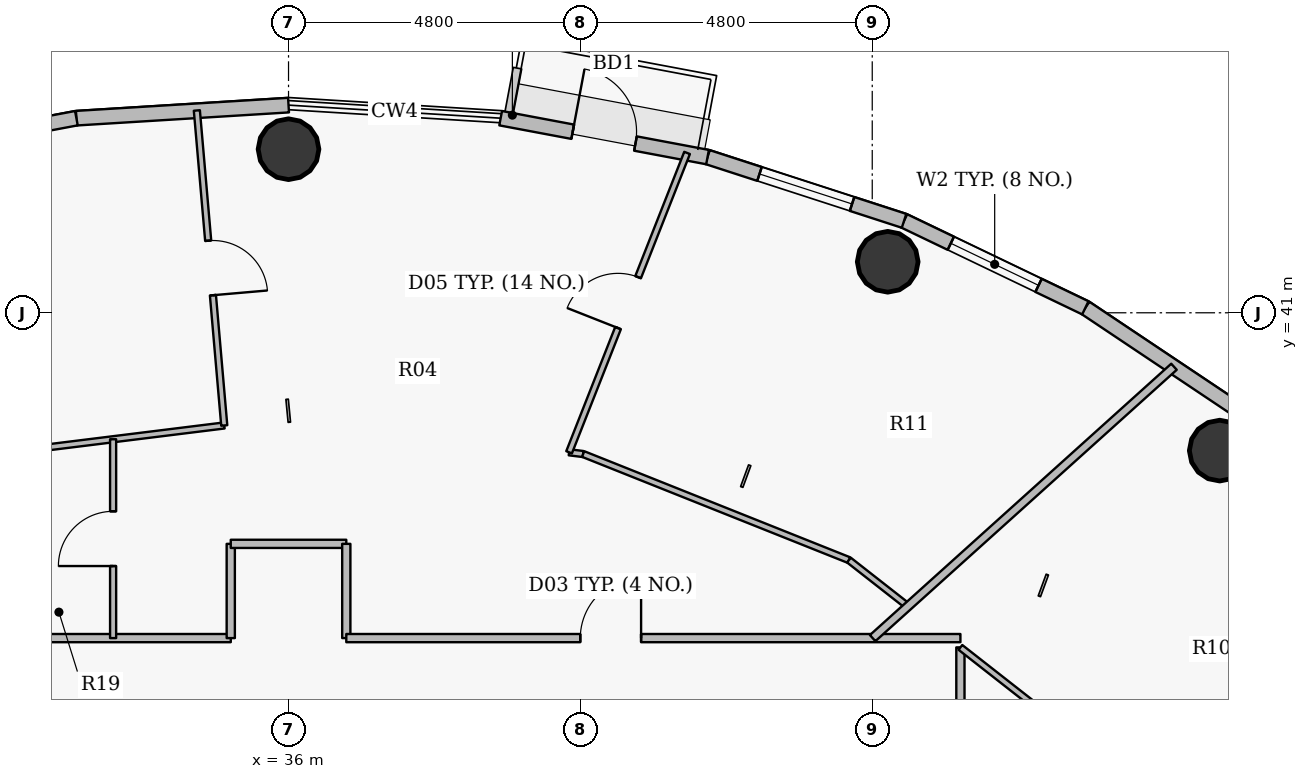
"""IFC4 building model, lengths in metres.
Left out: names, types, materials, properties, quantities, classifications, styles, units other than length and angle.
Written with IfcOpenShell. Run it as: python <this file> out.ifc"""

import sys

from ifc_helpers import new_model, si_unit, direction, frame, frame_2d, origin, origin_2d, place, context, subcontext, project, spatial, rectangle, hollow_circle, extrude, source, transform, mapped, element, fill, save


model = new_model("IFC4")
c1 = context("Model", 3, precision=1e-05, world=origin(), true_north=direction((0.0, 1.0)))
c2 = subcontext(c1, "Body", "Model", "MODEL_VIEW")
j1 = project(units=[si_unit("LENGTHUNIT", "METRE"), si_unit("PLANEANGLEUNIT", "RADIAN")], contexts=[c1])
p1 = place(None, origin())
s1 = spatial("IfcSite", under=j1, at=p1, CompositionType="ELEMENT")
p2 = place(p1, origin())
s2 = spatial("IfcBuilding", under=s1, at=p2, CompositionType="ELEMENT")
p3 = place(p2, frame((0.0, 0.0, 291.75)))
s3 = spatial("IfcBuildingStorey", under=s2, at=p3, CompositionType="ELEMENT", Elevation=291.75)
for number, where, z_axis, x_axis in (
    (1, (51.315, 38.733, 0.0), (0.0, 0.0, 1.0), (1.0, 0.0, 0.0)),
    (2, (45.854, 41.839, 0.0), (0.0, 0.0, 1.0), (1.0, 0.0, 0.0)),
    (3, (36.0, 43.69, 0.0), (0.0, 0.0, 1.0), (1.0, 0.0, 0.0)),
):
    element("IfcColumn", number, at=place(p3, frame(where, z_axis=z_axis, x_axis=x_axis)), inside=s3, PredefinedType="COLUMN", context=c2, shape_type="SweptSolid", body=[
        extrude(hollow_circle(Radius=0.5, WallThickness=0.032, at=origin_2d()), origin(), (0.0, 0.0, 1.0), 3.75),
    ])
p4 = place(p3, frame((49.104, 41.082, 0.0), z_axis=(0.0, 0.0, 1.0), x_axis=(0.831250592635, -0.55589787933, 0.0)))
e4 = element("IfcWall", 4, at=p4, inside=s3, PredefinedType="SOLIDWALL", context=c2, shape_type="SweptSolid", body=[
    extrude(rectangle(XDim=3.197, YDim=0.24, at=frame_2d((1.599, 0.0))), origin(), (0.0, 0.0, 1.0), 3.5),
])
p5 = place(p3, frame((46.123, 42.512, 0.0), z_axis=(0.0, 0.0, 1.0), x_axis=(0.901573741254, -0.43262546051, 0.0)))
e5 = element("IfcWall", 5, at=p5, inside=s3, PredefinedType="SOLIDWALL", context=c2, shape_type="SweptSolid", body=[
    extrude(rectangle(XDim=3.307, YDim=0.24, at=frame_2d((1.653, 0.0))), origin(), (0.0, 0.0, 1.0), 3.5),
])
p6 = place(p5, frame((0.853, 0.0, 0.9)))
e6 = element("IfcOpeningElement", 6, at=p6, cuts=e5, PredefinedType="OPENING", context=c2, shape_type="SweptSolid", body=[
    extrude(rectangle(XDim=1.6, YDim=1.75, at=origin_2d()), frame((0.8, 0.13, 0.875), z_axis=(0.0, -1.0, 0.0), x_axis=(1.0, 0.0, 0.0)), (0.0, 0.0, 1.0), 0.26),
])
p7 = place(p3, frame((42.891, 43.56, 0.0), z_axis=(0.0, 0.0, 1.0), x_axis=(0.95123136723, -0.308478339592, 0.0)))
e7 = element("IfcWall", 7, at=p7, inside=s3, PredefinedType="SOLIDWALL", context=c2, shape_type="SweptSolid", body=[
    extrude(rectangle(XDim=3.398, YDim=0.24, at=frame_2d((1.699, 0.0))), origin(), (0.0, 0.0, 1.0), 3.5),
])
p8 = place(p7, frame((0.899, 0.0, 0.9)))
e8 = element("IfcOpeningElement", 8, at=p8, cuts=e7, PredefinedType="OPENING", context=c2, shape_type="SweptSolid", body=[
    extrude(rectangle(XDim=1.6, YDim=1.75, at=origin_2d()), frame((0.8, 0.13, 0.875), z_axis=(0.0, -1.0, 0.0), x_axis=(1.0, 0.0, 0.0)), (0.0, 0.0, 1.0), 0.26),
])
p9 = place(p3, frame((39.489, 44.2, 0.0), z_axis=(0.0, 0.0, 1.0), x_axis=(0.982782655757, -0.184765395959, 0.0)))
e9 = element("IfcWall", 9, at=p9, inside=s3, PredefinedType="SOLIDWALL", context=c2, shape_type="SweptSolid", body=[
    extrude(rectangle(XDim=3.462, YDim=0.24, at=frame_2d((1.731, 0.0))), origin(), (0.0, 0.0, 1.0), 3.5),
])
p10 = place(p9, frame((1.206, 0.0, 0.0)))
e10 = element("IfcOpeningElement", 10, at=p10, cuts=e9, PredefinedType="OPENING", context=c2, shape_type="SweptSolid", body=[
    extrude(rectangle(XDim=1.05, YDim=2.15, at=origin_2d()), frame((0.525, 0.13, 1.075), z_axis=(0.0, -1.0, 0.0), x_axis=(1.0, 0.0, 0.0)), (0.0, 0.0, 1.0), 0.26),
])
p11 = place(p3, frame((32.511, 44.2, 0.0), z_axis=(0.0, 0.0, 1.0), x_axis=(0.998104946479, 0.061534671648, 0.0)))
e11 = element("IfcWall", 11, at=p11, inside=s3, PredefinedType="SOLIDWALL", context=c2, shape_type="SweptSolid", body=[
    extrude(rectangle(XDim=3.495, YDim=0.24, at=frame_2d((1.748, 0.0))), origin(), (0.0, 0.0, 1.0), 3.5),
])
p12 = place(p3, frame((29.109, 43.56, 0.0), z_axis=(0.0, 0.0, 1.0), x_axis=(0.982782655757, 0.184765395959, 0.0)))
e12 = element("IfcWall", 12, at=p12, inside=s3, PredefinedType="SOLIDWALL", context=c2, shape_type="SweptSolid", body=[
    extrude(rectangle(XDim=3.462, YDim=0.24, at=frame_2d((1.731, 0.0))), origin(), (0.0, 0.0, 1.0), 3.5),
])
p13 = place(p12, frame((1.106, 0.0, 0.9)))
e13 = element("IfcOpeningElement", 13, at=p13, cuts=e12, PredefinedType="OPENING", context=c2, shape_type="SweptSolid", body=[
    extrude(rectangle(XDim=1.25, YDim=1.65, at=origin_2d()), frame((0.625, 0.13, 0.825), z_axis=(0.0, -1.0, 0.0), x_axis=(1.0, 0.0, 0.0)), (0.0, 0.0, 1.0), 0.26),
])
p14 = place(p3, frame((24.95, 35.65, 0.0), z_axis=(0.0, 0.0, 1.0), x_axis=(1.0, 0.0, 0.0)))
e14 = element("IfcWall", 14, at=p14, inside=s3, PredefinedType="PARTITIONING", context=c2, shape_type="SweptSolid", body=[
    extrude(rectangle(XDim=10.1, YDim=0.135, at=frame_2d((5.05, 0.0))), origin(), (0.0, 0.0, 1.0), 3.035),
])
p15 = place(p3, frame((31.333, 38.699, 0.0), z_axis=(0.0, 0.0, 1.0), x_axis=(0.992398193069, 0.123068380965, 0.0)))
e15 = element("IfcWall", 15, at=p15, inside=s3, PredefinedType="PARTITIONING", context=c2, shape_type="SweptSolid", body=[
    extrude(rectangle(XDim=3.638, YDim=0.1, at=frame_2d((1.819, 0.0))), origin(), (0.0, 0.0, 1.0), 3.185),
])
p16 = place(p3, frame((33.115, 35.65, 0.0), z_axis=(0.0, 0.0, 1.0), x_axis=(0.0, 1.0, 0.0)))
e16 = element("IfcWall", 16, at=p16, inside=s3, PredefinedType="PARTITIONING", context=c2, shape_type="SweptSolid", body=[
    extrude(rectangle(XDim=3.27, YDim=0.1, at=frame_2d((1.635, 0.0))), origin(), (0.0, 0.0, 1.0), 3.5),
])
p17 = place(p16, frame((1.185, 0.0, 0.0)))
e17 = element("IfcOpeningElement", 17, at=p17, cuts=e16, PredefinedType="OPENING", context=c2, shape_type="SweptSolid", body=[
    extrude(rectangle(XDim=0.9, YDim=2.1, at=origin_2d()), frame((0.45, 0.06, 1.05), z_axis=(0.0, -1.0, 0.0), x_axis=(1.0, 0.0, 0.0)), (0.0, 0.0, 1.0), 0.12),
])
p18 = place(p3, frame((34.492, 44.327, 0.0), z_axis=(0.0, 0.0, 1.0), x_axis=(0.086674190257, -0.9962367112, 0.0)))
e18 = element("IfcWall", 18, at=p18, inside=s3, PredefinedType="PARTITIONING", context=c2, shape_type="SweptSolid", body=[
    extrude(rectangle(XDim=5.2, YDim=0.1, at=frame_2d((2.6, 0.0))), origin(), (0.0, 0.0, 1.0), 2.985),
])
p19 = place(p18, frame((2.15, 0.0, 0.0)))
e19 = element("IfcOpeningElement", 19, at=p19, cuts=e18, PredefinedType="OPENING", context=c2, shape_type="SweptSolid", body=[
    extrude(rectangle(XDim=0.9, YDim=2.1, at=origin_2d()), frame((0.45, 0.06, 1.05), z_axis=(0.0, -1.0, 0.0), x_axis=(1.0, 0.0, 0.0)), (0.0, 0.0, 1.0), 0.12),
])
p20 = place(p3, frame((35.05, 35.65, 0.0), z_axis=(0.0, 0.0, 1.0), x_axis=(0.0, 1.0, 0.0)))
e20 = element("IfcWall", 20, at=p20, inside=s3, PredefinedType="PARTITIONING", context=c2, shape_type="SweptSolid", body=[
    extrude(rectangle(XDim=1.55, YDim=0.135, at=frame_2d((0.775, 0.0))), origin(), (0.0, 0.0, 1.0), 3.5),
])
p21 = place(p3, frame((35.05, 37.2, 0.0), z_axis=(0.0, 0.0, 1.0), x_axis=(1.0, 0.0, 0.0)))
e21 = element("IfcWall", 21, at=p21, inside=s3, PredefinedType="PARTITIONING", context=c2, shape_type="SweptSolid", body=[
    extrude(rectangle(XDim=1.9, YDim=0.135, at=frame_2d((0.95, 0.0))), origin(), (0.0, 0.0, 1.0), 3.035),
])
p22 = place(p3, frame((36.95, 35.65, 0.0), z_axis=(0.0, 0.0, 1.0), x_axis=(0.0, 1.0, 0.0)))
e22 = element("IfcWall", 22, at=p22, inside=s3, PredefinedType="PARTITIONING", context=c2, shape_type="SweptSolid", body=[
    extrude(rectangle(XDim=1.55, YDim=0.135, at=frame_2d((0.775, 0.0))), origin(), (0.0, 0.0, 1.0), 3.5),
])
p23 = place(p3, frame((36.95, 35.65, 0.0), z_axis=(0.0, 0.0, 1.0), x_axis=(1.0, 0.0, 0.0)))
e23 = element("IfcWall", 23, at=p23, inside=s3, PredefinedType="PARTITIONING", context=c2, shape_type="SweptSolid", body=[
    extrude(rectangle(XDim=10.1, YDim=0.135, at=frame_2d((5.05, 0.0))), origin(), (0.0, 0.0, 1.0), 3.035),
])
p24 = place(p23, frame((3.848, 0.0, 0.0)))
e24 = element("IfcOpeningElement", 24, at=p24, cuts=e23, PredefinedType="OPENING", context=c2, shape_type="SweptSolid", body=[
    extrude(rectangle(XDim=1.0, YDim=2.15, at=origin_2d()), frame((0.5, 0.078, 1.075), z_axis=(0.0, -1.0, 0.0), x_axis=(1.0, 0.0, 0.0)), (0.0, 0.0, 1.0), 0.155),
])
p25 = place(p3, frame((40.614, 38.706, 0.0), z_axis=(0.0, 0.0, 1.0), x_axis=(0.992326164187, -0.123647821937, 0.0)))
e25 = element("IfcWall", 25, at=p25, inside=s3, PredefinedType="PARTITIONING", context=c2, shape_type="SweptSolid", body=[
    extrude(rectangle(XDim=0.233, YDim=0.1, at=frame_2d((0.116, 0.0))), origin(), (0.0, 0.0, 1.0), 3.5),
])
p26 = place(p3, frame((40.614, 38.706, 0.0), z_axis=(0.0, 0.0, 1.0), x_axis=(0.36670847824, 0.930335902772, 0.0)))
e26 = element("IfcWall", 26, at=p26, inside=s3, PredefinedType="PARTITIONING", context=c2, shape_type="SweptSolid", body=[
    extrude(rectangle(XDim=5.292, YDim=0.1, at=frame_2d((2.646, 0.0))), origin(), (0.0, 0.0, 1.0), 2.985),
])
p27 = place(p26, frame((2.196, 0.0, 0.0)))
e27 = element("IfcOpeningElement", 27, at=p27, cuts=e26, PredefinedType="OPENING", context=c2, shape_type="SweptSolid", body=[
    extrude(rectangle(XDim=0.9, YDim=2.1, at=origin_2d()), frame((0.45, 0.06, 1.05), z_axis=(0.0, -1.0, 0.0), x_axis=(1.0, 0.0, 0.0)), (0.0, 0.0, 1.0), 0.12),
])
p28 = place(p3, frame((40.845, 38.677, 0.0), z_axis=(0.0, 0.0, 1.0), x_axis=(0.928809047774, -0.370558703544, 0.0)))
e28 = element("IfcWall", 28, at=p28, inside=s3, PredefinedType="PARTITIONING", context=c2, shape_type="SweptSolid", body=[
    extrude(rectangle(XDim=4.706, YDim=0.1, at=frame_2d((2.353, 0.0))), origin(), (0.0, 0.0, 1.0), 3.035),
])
p29 = place(p3, frame((45.217, 36.933, 0.0), z_axis=(0.0, 0.0, 1.0), x_axis=(0.787354580016, -0.616500417946, 0.0)))
e29 = element("IfcWall", 29, at=p29, inside=s3, PredefinedType="PARTITIONING", context=c2, shape_type="SweptSolid", body=[
    extrude(rectangle(XDim=1.233, YDim=0.1, at=frame_2d((0.617, 0.0))), origin(), (0.0, 0.0, 1.0), 3.5),
])
p30 = place(p3, frame((45.607, 35.65, 0.0), z_axis=(0.0, 0.0, 1.0), x_axis=(0.743148504456, 0.669126520416, 0.0)))
e30 = element("IfcWall", 30, at=p30, inside=s3, PredefinedType="PARTITIONING", context=c2, shape_type="SweptSolid", body=[
    extrude(rectangle(XDim=6.669, YDim=0.135, at=frame_2d((3.334, 0.0))), origin(), (0.0, 0.0, 1.0), 2.985),
])
p31 = place(p3, frame((47.05, 18.503, 0.0), z_axis=(0.0, 0.0, 1.0), x_axis=(0.0, 1.0, 0.0)))
e31 = element("IfcWall", 31, at=p31, inside=s3, PredefinedType="PARTITIONING", context=c2, shape_type="SweptSolid", body=[
    extrude(rectangle(XDim=16.995, YDim=0.135, at=frame_2d((8.497, 0.0))), origin(), (0.0, 0.0, 1.0), 3.035),
])
p32 = place(p31, frame((7.997, 0.0, 0.0)))
e32 = element("IfcOpeningElement", 32, at=p32, cuts=e31, PredefinedType="OPENING", context=c2, shape_type="SweptSolid", body=[
    extrude(rectangle(XDim=1.0, YDim=2.15, at=origin_2d()), frame((0.5, 0.078, 1.075), z_axis=(0.0, -1.0, 0.0), x_axis=(1.0, 0.0, 0.0)), (0.0, 0.0, 1.0), 0.155),
])
p33 = place(p3, frame((47.05, 35.497, 0.0), z_axis=(0.0, 0.0, 1.0), x_axis=(0.787328855274, -0.616533270516, 0.0)))
e33 = element("IfcWall", 33, at=p33, inside=s3, PredefinedType="PARTITIONING", context=c2, shape_type="SweptSolid", body=[
    extrude(rectangle(XDim=2.077, YDim=0.1, at=frame_2d((1.039, 0.0))), origin(), (0.0, 0.0, 1.0), 3.035),
])
m1 = source(origin(), c2, "Body", "SweptSolid", [
    extrude(rectangle(XDim=1.6, YDim=1.75, at=origin_2d()), frame((0.8, 0.03, 0.875), z_axis=(0.0, -1.0, 0.0), x_axis=(1.0, 0.0, 0.0)), (0.0, 0.0, 1.0), 0.06),
])
p34 = place(p6, origin())
e34 = element("IfcWindow", 34, at=p34, inside=s3, PartitioningType="DOUBLE_PANEL_VERTICAL", PredefinedType="WINDOW", context=c2, shape_type="MappedRepresentation", body=[
    mapped(m1, transform((0.0, 0.0, 0.0), x_axis=(1.0, 0.0, 0.0), y_axis=(0.0, 1.0, 0.0), z_axis=(0.0, 0.0, 1.0), scale=1.0)),
])
fill(e6, e34)
p35 = place(p8, origin())
e35 = element("IfcWindow", 35, at=p35, inside=s3, PartitioningType="DOUBLE_PANEL_VERTICAL", PredefinedType="WINDOW", context=c2, shape_type="MappedRepresentation", body=[
    mapped(m1, transform((0.0, 0.0, 0.0), x_axis=(1.0, 0.0, 0.0), y_axis=(0.0, 1.0, 0.0), z_axis=(0.0, 0.0, 1.0), scale=1.0)),
])
fill(e8, e35)
m2 = source(origin(), c2, "Body", "SweptSolid", [
    extrude(rectangle(XDim=1.05, YDim=2.15, at=origin_2d()), frame((0.525, 0.025, 1.075), z_axis=(0.0, -1.0, 0.0), x_axis=(1.0, 0.0, 0.0)), (0.0, 0.0, 1.0), 0.05),
])
p36 = place(p10, origin())
e36 = element("IfcDoor", 36, at=p36, inside=s3, OperationType="SINGLE_SWING_LEFT", PredefinedType="DOOR", context=c2, shape_type="MappedRepresentation", body=[
    mapped(m2, transform((0.0, 0.0, 0.0), x_axis=(1.0, 0.0, 0.0), y_axis=(0.0, 1.0, 0.0), z_axis=(0.0, 0.0, 1.0), scale=1.0)),
])
fill(e10, e36)
m3 = source(origin(), c2, "Body", "SweptSolid", [
    extrude(rectangle(XDim=1.0, YDim=2.15, at=origin_2d()), frame((0.5, 0.025, 1.075), z_axis=(0.0, -1.0, 0.0), x_axis=(1.0, 0.0, 0.0)), (0.0, 0.0, 1.0), 0.05),
])
p37 = place(p24, origin())
e37 = element("IfcDoor", 37, at=p37, inside=s3, OperationType="SINGLE_SWING_RIGHT", PredefinedType="DOOR", context=c2, shape_type="MappedRepresentation", body=[
    mapped(m3, transform((0.0, 0.0, 0.0), x_axis=(1.0, 0.0, 0.0), y_axis=(0.0, 1.0, 0.0), z_axis=(0.0, 0.0, 1.0), scale=1.0)),
])
fill(e24, e37)
m4 = source(origin(), c2, "Body", "SweptSolid", [
    extrude(rectangle(XDim=0.9, YDim=2.1, at=origin_2d()), frame((0.45, 0.025, 1.05), z_axis=(0.0, -1.0, 0.0), x_axis=(1.0, 0.0, 0.0)), (0.0, 0.0, 1.0), 0.05),
])
p38 = place(p27, origin())
e38 = element("IfcDoor", 38, at=p38, inside=s3, OperationType="SINGLE_SWING_LEFT", PredefinedType="DOOR", context=c2, shape_type="MappedRepresentation", body=[
    mapped(m4, transform((0.0, 0.0, 0.0), x_axis=(1.0, 0.0, 0.0), y_axis=(0.0, 1.0, 0.0), z_axis=(0.0, 0.0, 1.0), scale=1.0)),
])
fill(e27, e38)
p39 = place(p19, origin())
e39 = element("IfcDoor", 39, at=p39, inside=s3, OperationType="SINGLE_SWING_RIGHT", PredefinedType="DOOR", context=c2, shape_type="MappedRepresentation", body=[
    mapped(m4, transform((0.0, 0.0, 0.0), x_axis=(1.0, 0.0, 0.0), y_axis=(0.0, 1.0, 0.0), z_axis=(0.0, 0.0, 1.0), scale=1.0)),
])
fill(e19, e39)
p40 = place(p17, origin())
e40 = element("IfcDoor", 40, at=p40, inside=s3, OperationType="SINGLE_SWING_LEFT", PredefinedType="DOOR", context=c2, shape_type="MappedRepresentation", body=[
    mapped(m4, transform((0.0, 0.0, 0.0), x_axis=(1.0, 0.0, 0.0), y_axis=(0.0, 1.0, 0.0), z_axis=(0.0, 0.0, 1.0), scale=1.0)),
])
fill(e17, e40)
save(model, sys.argv[1])
